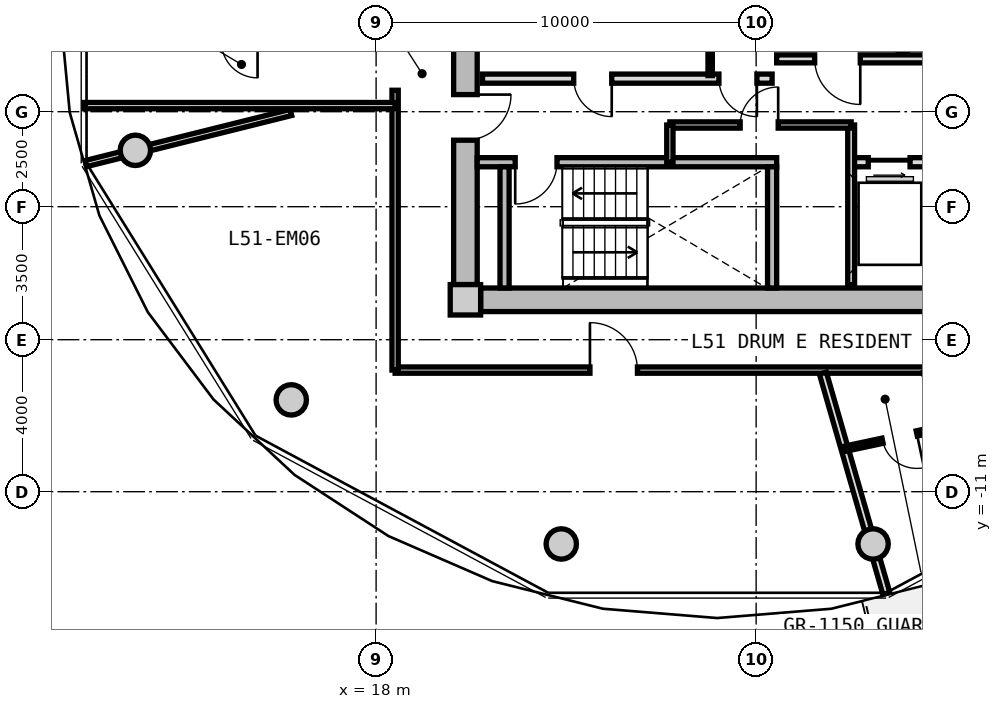
"""IFC4 building model, lengths in metres.
Left out: names, types, materials, properties, quantities, classifications, styles, units other than length and angle.
Written with IfcOpenShell. Run it as: python <this file> out.ifc"""

import sys

from ifc_helpers import new_model, si_unit, direction, frame, frame_2d, origin, origin_2d, place, context, subcontext, project, spatial, rectangle, circle, extrude, source, transform, mapped, element, fill, save


model = new_model("IFC4")
c1 = context("Model", 3, precision=1e-05, world=origin(), true_north=direction((0.0, 1.0)))
c2 = subcontext(c1, "Body", "Model", "MODEL_VIEW")
j1 = project(units=[si_unit("LENGTHUNIT", "METRE"), si_unit("PLANEANGLEUNIT", "RADIAN")], contexts=[c1])
p1 = place(None, origin())
s1 = spatial("IfcSite", under=j1, at=p1, CompositionType="ELEMENT")
p2 = place(p1, origin())
s2 = spatial("IfcBuilding", under=s1, at=p2, CompositionType="ELEMENT")
p3 = place(p2, frame((0.0, 0.0, 164.8)))
s3 = spatial("IfcBuildingStorey", under=s2, at=p3, CompositionType="ELEMENT", Elevation=164.8)
m1 = source(origin(), c2, "Body", "SweptSolid", [
    extrude(rectangle(XDim=0.8, YDim=0.8, at=origin_2d()), origin(), (0.0, 0.0, 1.0), 3.05),
])
p4 = place(p3, frame((20.35, -5.95, 0.0), z_axis=(0.0, 0.0, 1.0), x_axis=(1.0, 0.0, 0.0)))
e1 = element("IfcColumn", 1, at=p4, inside=s3, PredefinedType="COLUMN", context=c2, shape_type="MappedRepresentation", body=[
    mapped(m1, transform((0.0, 0.0, 0.0), x_axis=(1.0, 0.0, 0.0), y_axis=(0.0, 1.0, 0.0), z_axis=(0.0, 0.0, 1.0), scale=1.0)),
])
m2 = source(origin(), c2, "Body", "SweptSolid", [
    extrude(rectangle(XDim=14.5, YDim=0.62, at=frame_2d((7.25, 0.0))), origin(), (0.0, 0.0, 1.0), 2.81),
])
p5 = place(p3, frame((35.25, -5.95, 0.0), z_axis=(0.0, 0.0, 1.0), x_axis=(-1.0, 0.0, 0.0)))
e2 = element("IfcWall", 2, at=p5, inside=s3, PredefinedType="SHEAR", context=c2, shape_type="MappedRepresentation", body=[
    mapped(m2, transform((0.0, 0.0, 0.0), x_axis=(1.0, 0.0, 0.0), y_axis=(0.0, 1.0, 0.0), z_axis=(0.0, 0.0, 1.0), scale=1.0)),
])
m3 = source(origin(), c2, "Body", "SweptSolid", [
    extrude(rectangle(XDim=11.1, YDim=0.62, at=frame_2d((5.55, 0.0))), origin(), (0.0, 0.0, 1.0), 2.81),
])
p6 = place(p3, frame((20.35, -5.55, 0.0), z_axis=(0.0, 0.0, 1.0), x_axis=(0.0, 1.0, 0.0)))
e3 = element("IfcWall", 3, at=p6, inside=s3, PredefinedType="SHEAR", context=c2, shape_type="MappedRepresentation", body=[
    mapped(m3, transform((0.0, 0.0, 0.0), x_axis=(1.0, 0.0, 0.0), y_axis=(0.0, 1.0, 0.0), z_axis=(0.0, 0.0, 1.0), scale=1.0)),
])
p7 = place(p6, frame((3.8, 0.0, 0.0)))
e4 = element("IfcOpeningElement", 4, at=p7, cuts=e3, PredefinedType="OPENING", context=c2, shape_type="SweptSolid", body=[
    extrude(rectangle(XDim=1.2, YDim=2.15, at=frame_2d((0.6, 1.075))), frame((0.0, 0.32, 0.0), z_axis=(0.0, -1.0, 0.0), x_axis=(1.0, 0.0, 0.0)), (0.0, 0.0, 1.0), 0.64),
])
m4 = source(origin(), c2, "Body", "SweptSolid", [
    extrude(circle(Radius=0.4, at=origin_2d()), origin(), (0.0, 0.0, 1.0), 3.05),
])
for number, where, z_axis, x_axis in (
    (5, (11.665, -2.016, 0.0), (0.0, 0.0, 1.0), (1.0, 0.0, 0.0)),
    (6, (15.767, -8.584, 0.0), (0.0, 0.0, 1.0), (1.0, 0.0, 0.0)),
    (7, (22.873, -12.375, 0.0), (0.0, 0.0, 1.0), (1.0, 0.0, 0.0)),
    (8, (31.077, -12.375, 0.0), (0.0, 0.0, 1.0), (1.0, 0.0, 0.0)),
):
    element("IfcColumn", number, at=place(p3, frame(where, z_axis=z_axis, x_axis=x_axis)), inside=s3, PredefinedType="COLUMN", context=c2, shape_type="MappedRepresentation", body=[
        mapped(m4, transform((0.0, 0.0, 0.0), x_axis=(1.0, 0.0, 0.0), y_axis=(0.0, 1.0, 0.0), z_axis=(0.0, 0.0, 1.0), scale=1.0)),
    ])
m5 = source(origin(), c2, "Body", "SweptSolid", [
    extrude(rectangle(XDim=7.88, YDim=0.24, at=frame_2d((3.94, 0.0))), origin(), (0.0, 0.0, 1.0), 2.81),
])
p8 = place(p3, frame((20.66, -2.33, 0.0), z_axis=(0.0, 0.0, 1.0), x_axis=(1.0, 0.0, 0.0)))
e9 = element("IfcWall", 9, at=p8, inside=s3, PredefinedType="PARTITIONING", context=c2, shape_type="MappedRepresentation", body=[
    mapped(m5, transform((0.0, 0.0, 0.0), x_axis=(1.0, 0.0, 0.0), y_axis=(0.0, 1.0, 0.0), z_axis=(0.0, 0.0, 1.0), scale=1.0)),
])
p9 = place(p8, frame((1.0, 0.0, 0.0)))
e10 = element("IfcOpeningElement", 10, at=p9, cuts=e9, PredefinedType="OPENING", context=c2, shape_type="SweptSolid", body=[
    extrude(rectangle(XDim=1.1, YDim=2.15, at=frame_2d((0.55, 1.075))), frame((0.0, 0.13, 0.0), z_axis=(0.0, -1.0, 0.0), x_axis=(1.0, 0.0, 0.0)), (0.0, 0.0, 1.0), 0.26),
])
m6 = source(origin(), c2, "Body", "SweptSolid", [
    extrude(rectangle(XDim=3.19, YDim=0.24, at=frame_2d((1.595, 0.0))), origin(), (0.0, 0.0, 1.0), 2.81),
])
for number, where, z_axis, x_axis in (
    (11, (21.38, -5.64, 0.0), (0.0, 0.0, 1.0), (0.0, 1.0, 0.0)),
    (12, (28.42, -5.64, 0.0), (0.0, 0.0, 1.0), (0.0, 1.0, 0.0)),
):
    element("IfcWall", number, at=place(p3, frame(where, z_axis=z_axis, x_axis=x_axis)), inside=s3, PredefinedType="PARTITIONING", context=c2, shape_type="MappedRepresentation", body=[
        mapped(m6, transform((0.0, 0.0, 0.0), x_axis=(1.0, 0.0, 0.0), y_axis=(0.0, 1.0, 0.0), z_axis=(0.0, 0.0, 1.0), scale=1.0)),
    ])
m7 = source(origin(), c2, "Body", "SweptSolid", [
    extrude(rectangle(XDim=5.0, YDim=0.24, at=frame_2d((2.5, 0.0))), origin(), (0.0, 0.0, 1.0), 2.795),
])
p10 = place(p3, frame((31.86, 0.5, 0.0), z_axis=(0.0, 0.0, 1.0), x_axis=(0.0, 1.0, 0.0)))
e13 = element("IfcWall", 13, at=p10, inside=s3, PredefinedType="PARTITIONING", context=c2, shape_type="MappedRepresentation", body=[
    mapped(m7, transform((0.0, 0.0, 0.0), x_axis=(1.0, 0.0, 0.0), y_axis=(0.0, 1.0, 0.0), z_axis=(0.0, 0.0, 1.0), scale=1.0)),
])
p11 = place(p10, frame((3.05, 0.0, 0.0)))
e14 = element("IfcOpeningElement", 14, at=p11, cuts=e13, PredefinedType="OPENING", context=c2, shape_type="SweptSolid", body=[
    extrude(rectangle(XDim=1.3, YDim=2.2, at=frame_2d((0.65, 1.1))), frame((0.0, 0.13, 0.0), z_axis=(0.0, -1.0, 0.0), x_axis=(1.0, 0.0, 0.0)), (0.0, 0.0, 1.0), 0.26),
])
p12 = place(p10, frame((0.55, 0.0, 0.0)))
e15 = element("IfcOpeningElement", 15, at=p12, cuts=e13, PredefinedType="OPENING", context=c2, shape_type="SweptSolid", body=[
    extrude(rectangle(XDim=1.3, YDim=2.2, at=frame_2d((0.65, 1.1))), frame((0.0, 0.13, 0.0), z_axis=(0.0, -1.0, 0.0), x_axis=(1.0, 0.0, 0.0)), (0.0, 0.0, 1.0), 0.26),
])
m8 = source(origin(), c2, "Body", "SweptSolid", [
    extrude(rectangle(XDim=6.66, YDim=0.21, at=frame_2d((3.33, 0.0))), origin(), (0.0, 0.0, 1.0), 2.795),
])
p13 = place(p3, frame((28.54, 0.39, 0.0), z_axis=(0.0, 0.0, 1.0), x_axis=(1.0, 0.0, 0.0)))
e16 = element("IfcWall", 16, at=p13, inside=s3, PredefinedType="PARTITIONING", context=c2, shape_type="MappedRepresentation", body=[
    mapped(m8, transform((0.0, 0.0, 0.0), x_axis=(1.0, 0.0, 0.0), y_axis=(0.0, 1.0, 0.0), z_axis=(0.0, 0.0, 1.0), scale=1.0)),
])
p14 = place(p13, frame((1.0, 0.0, 0.0)))
e17 = element("IfcOpeningElement", 17, at=p14, cuts=e16, PredefinedType="OPENING", context=c2, shape_type="SweptSolid", body=[
    extrude(rectangle(XDim=1.2, YDim=2.15, at=frame_2d((0.6, 1.075))), frame((0.0, 0.115, 0.0), z_axis=(0.0, -1.0, 0.0), x_axis=(1.0, 0.0, 0.0)), (0.0, 0.0, 1.0), 0.23),
])
m9 = source(origin(), c2, "Body", "SweptSolid", [
    extrude(rectangle(XDim=7.62, YDim=0.24, at=frame_2d((3.81, 0.0))), origin(), (0.0, 0.0, 1.0), 2.795),
])
p15 = place(p3, frame((20.8, -0.13, 0.0), z_axis=(0.0, 0.0, 1.0), x_axis=(1.0, 0.0, 0.0)))
e18 = element("IfcWall", 18, at=p15, inside=s3, PredefinedType="PARTITIONING", context=c2, shape_type="MappedRepresentation", body=[
    mapped(m9, transform((0.0, 0.0, 0.0), x_axis=(1.0, 0.0, 0.0), y_axis=(0.0, 1.0, 0.0), z_axis=(0.0, 0.0, 1.0), scale=1.0)),
])
p16 = place(p15, frame((6.22, 0.0, 0.0)))
e19 = element("IfcOpeningElement", 19, at=p16, cuts=e18, PredefinedType="OPENING", context=c2, shape_type="SweptSolid", body=[
    extrude(rectangle(XDim=1.0, YDim=2.1, at=frame_2d((0.5, 1.05))), frame((0.0, 0.13, 0.0), z_axis=(0.0, -1.0, 0.0), x_axis=(1.0, 0.0, 0.0)), (0.0, 0.0, 1.0), 0.26),
])
p17 = place(p15, frame((2.4, 0.0, 0.0)))
e20 = element("IfcOpeningElement", 20, at=p17, cuts=e18, PredefinedType="OPENING", context=c2, shape_type="SweptSolid", body=[
    extrude(rectangle(XDim=1.0, YDim=2.1, at=frame_2d((0.5, 1.05))), frame((0.0, 0.13, 0.0), z_axis=(0.0, -1.0, 0.0), x_axis=(1.0, 0.0, 0.0)), (0.0, 0.0, 1.0), 0.26),
])
m10 = source(origin(), c2, "Body", "SweptSolid", [
    extrude(rectangle(XDim=2.33, YDim=0.115, at=frame_2d((1.165, 0.0))), origin(), (0.0, 0.0, 1.0), 2.795),
])
p18 = place(p3, frame((26.79, -0.05, 0.0), z_axis=(0.0, 0.0, 1.0), x_axis=(0.0, 1.0, 0.0)))
e21 = element("IfcWall", 21, at=p18, inside=s3, PredefinedType="PARTITIONING", context=c2, shape_type="MappedRepresentation", body=[
    mapped(m10, transform((0.0, 0.0, 0.0), x_axis=(1.0, 0.0, 0.0), y_axis=(0.0, 1.0, 0.0), z_axis=(0.0, 0.0, 1.0), scale=1.0)),
])
m11 = source(origin(), c2, "Body", "SweptSolid", [
    extrude(rectangle(XDim=2.05, YDim=0.24, at=frame_2d((1.025, 0.0))), origin(), (0.0, 0.0, 1.0), 2.795),
])
p19 = place(p3, frame((30.5, -2.33, 0.0), z_axis=(0.0, 0.0, 1.0), x_axis=(1.0, 0.0, 0.0)))
e22 = element("IfcWall", 22, at=p19, inside=s3, PredefinedType="PARTITIONING", context=c2, shape_type="MappedRepresentation", body=[
    mapped(m11, transform((0.0, 0.0, 0.0), x_axis=(1.0, 0.0, 0.0), y_axis=(0.0, 1.0, 0.0), z_axis=(0.0, 0.0, 1.0), scale=1.0)),
])
p20 = place(p19, frame((0.45, 0.0, 0.0)))
e23 = element("IfcOpeningElement", 23, at=p20, cuts=e22, PredefinedType="OPENING", context=c2, shape_type="SweptSolid", body=[
    extrude(rectangle(XDim=1.1, YDim=2.2, at=frame_2d((0.55, 1.1))), frame((0.0, 0.13, 0.0), z_axis=(0.0, -1.0, 0.0), x_axis=(1.0, 0.0, 0.0)), (0.0, 0.0, 1.0), 0.26),
])
m12 = source(origin(), c2, "Body", "SweptSolid", [
    extrude(rectangle(XDim=4.2, YDim=0.18, at=frame_2d((2.1, 0.0))), origin(), (0.0, 0.0, 1.0), 2.795),
])
p21 = place(p3, frame((30.5, -5.55, 0.0), z_axis=(0.0, 0.0, 1.0), x_axis=(0.0, 1.0, 0.0)))
e24 = element("IfcWall", 24, at=p21, inside=s3, PredefinedType="PARTITIONING", context=c2, shape_type="MappedRepresentation", body=[
    mapped(m12, transform((0.0, 0.0, 0.0), x_axis=(1.0, 0.0, 0.0), y_axis=(0.0, 1.0, 0.0), z_axis=(0.0, 0.0, 1.0), scale=1.0)),
])
m13 = source(origin(), c2, "Body", "SweptSolid", [
    extrude(rectangle(XDim=4.77, YDim=0.165, at=frame_2d((2.385, 0.0))), origin(), (0.0, 0.0, 1.0), 2.795),
])
p22 = place(p3, frame((25.73, -1.35, 0.0), z_axis=(0.0, 0.0, 1.0), x_axis=(1.0, 0.0, 0.0)))
e25 = element("IfcWall", 25, at=p22, inside=s3, PredefinedType="PARTITIONING", context=c2, shape_type="MappedRepresentation", body=[
    mapped(m13, transform((0.0, 0.0, 0.0), x_axis=(1.0, 0.0, 0.0), y_axis=(0.0, 1.0, 0.0), z_axis=(0.0, 0.0, 1.0), scale=1.0)),
])
p23 = place(p22, frame((1.85, 0.0, 0.0)))
e26 = element("IfcOpeningElement", 26, at=p23, cuts=e25, PredefinedType="OPENING", context=c2, shape_type="SweptSolid", body=[
    extrude(rectangle(XDim=1.0, YDim=2.1, at=frame_2d((0.5, 1.05))), frame((0.0, 0.093, 0.0), z_axis=(0.0, -1.0, 0.0), x_axis=(1.0, 0.0, 0.0)), (0.0, 0.0, 1.0), 0.185),
])
m14 = source(origin(), c2, "Body", "SweptSolid", [
    extrude(rectangle(XDim=0.98, YDim=0.165, at=frame_2d((0.49, 0.0))), origin(), (0.0, 0.0, 1.0), 2.795),
])
p24 = place(p3, frame((25.73, -2.33, 0.0), z_axis=(0.0, 0.0, 1.0), x_axis=(0.0, 1.0, 0.0)))
e27 = element("IfcWall", 27, at=p24, inside=s3, PredefinedType="PARTITIONING", context=c2, shape_type="MappedRepresentation", body=[
    mapped(m14, transform((0.0, 0.0, 0.0), x_axis=(1.0, 0.0, 0.0), y_axis=(0.0, 1.0, 0.0), z_axis=(0.0, 0.0, 1.0), scale=1.0)),
])
m15 = source(origin(), c2, "Body", "SweptSolid", [
    extrude(rectangle(XDim=19.0, YDim=0.165, at=frame_2d((9.5, 0.0))), origin(), (0.0, 0.0, 1.0), 2.795),
])
p25 = place(p3, frame((37.5, -7.8, 0.0), z_axis=(0.0, 0.0, 1.0), x_axis=(-1.0, 0.0, 0.0)))
e28 = element("IfcWall", 28, at=p25, inside=s3, PredefinedType="PARTITIONING", context=c2, shape_type="MappedRepresentation", body=[
    mapped(m15, transform((0.0, 0.0, 0.0), x_axis=(1.0, 0.0, 0.0), y_axis=(0.0, 1.0, 0.0), z_axis=(0.0, 0.0, 1.0), scale=1.0)),
])
p26 = place(p25, frame((12.623, 0.0, 0.0)))
e29 = element("IfcOpeningElement", 29, at=p26, cuts=e28, PredefinedType="OPENING", context=c2, shape_type="SweptSolid", body=[
    extrude(rectangle(XDim=1.25, YDim=2.2, at=frame_2d((0.625, 1.1))), frame((0.0, 0.093, 0.0), z_axis=(0.0, -1.0, 0.0), x_axis=(1.0, 0.0, 0.0)), (0.0, 0.0, 1.0), 0.185),
])
m16 = source(origin(), c2, "Body", "SweptSolid", [
    extrude(rectangle(XDim=7.365, YDim=0.165, at=frame_2d((3.682, 0.0))), origin(), (0.0, 0.0, 1.0), 2.795),
])
p27 = place(p3, frame((18.5, -7.8, 0.0), z_axis=(0.0, 0.0, 1.0), x_axis=(0.0, 1.0, 0.0)))
e30 = element("IfcWall", 30, at=p27, inside=s3, PredefinedType="PARTITIONING", context=c2, shape_type="MappedRepresentation", body=[
    mapped(m16, transform((0.0, 0.0, 0.0), x_axis=(1.0, 0.0, 0.0), y_axis=(0.0, 1.0, 0.0), z_axis=(0.0, 0.0, 1.0), scale=1.0)),
])
m17 = source(origin(), c2, "Body", "SweptSolid", [
    extrude(rectangle(XDim=5.564, YDim=0.165, at=frame_2d((2.782, 0.0))), origin(), (0.0, 0.0, 1.0), 2.345),
])
p28 = place(p3, frame((15.76, -1.02, 0.0), z_axis=(0.0, 0.0, 1.0), x_axis=(-0.970315176167, -0.241843872984, 0.0)))
e31 = element("IfcWall", 31, at=p28, inside=s3, PredefinedType="PARTITIONING", context=c2, shape_type="MappedRepresentation", body=[
    mapped(m17, transform((0.0, 0.0, 0.0), x_axis=(1.0, 0.0, 0.0), y_axis=(0.0, 1.0, 0.0), z_axis=(0.0, 0.0, 1.0), scale=1.0)),
])
m18 = source(origin(), c2, "Body", "SweptSolid", [
    extrude(rectangle(XDim=8.189, YDim=0.165, at=frame_2d((4.094, 0.0))), origin(), (0.0, 0.0, 1.0), 2.795),
])
p29 = place(p3, frame((18.5, -0.84, 0.0), z_axis=(0.0, 0.0, 1.0), x_axis=(-1.0, 0.0, 0.0)))
e32 = element("IfcWall", 32, at=p29, inside=s3, PredefinedType="PARTITIONING", context=c2, shape_type="MappedRepresentation", body=[
    mapped(m18, transform((0.0, 0.0, 0.0), x_axis=(1.0, 0.0, 0.0), y_axis=(0.0, 1.0, 0.0), z_axis=(0.0, 0.0, 1.0), scale=1.0)),
])
m19 = source(origin(), c2, "Body", "SweptSolid", [
    extrude(rectangle(XDim=6.035, YDim=0.19, at=frame_2d((3.018, 0.0))), origin(), (0.0, 0.0, 1.0), 2.345),
])
p30 = place(p3, frame((29.756, -7.88, 0.0), z_axis=(0.0, 0.0, 1.0), x_axis=(0.276809454862, -0.960924828329, 0.0)))
e33 = element("IfcWall", 33, at=p30, inside=s3, PredefinedType="PARTITIONING", context=c2, shape_type="MappedRepresentation", body=[
    mapped(m19, transform((0.0, 0.0, 0.0), x_axis=(1.0, 0.0, 0.0), y_axis=(0.0, 1.0, 0.0), z_axis=(0.0, 0.0, 1.0), scale=1.0)),
])
m20 = source(origin(), c2, "Body", "SweptSolid", [
    extrude(rectangle(XDim=1.635, YDim=0.14, at=frame_2d((0.817, 0.0))), origin(), (0.0, 0.0, 1.0), 2.795),
])
p31 = place(p3, frame((32.434, -7.83, 0.0), z_axis=(0.0, 0.0, 1.0), x_axis=(0.494078690764, -0.869417188312, 0.0)))
e34 = element("IfcWall", 34, at=p31, inside=s3, PredefinedType="PARTITIONING", context=c2, shape_type="MappedRepresentation", body=[
    mapped(m20, transform((0.0, 0.0, 0.0), x_axis=(1.0, 0.0, 0.0), y_axis=(0.0, 1.0, 0.0), z_axis=(0.0, 0.0, 1.0), scale=1.0)),
])
m21 = source(origin(), c2, "Body", "SweptSolid", [
    extrude(rectangle(XDim=2.995, YDim=0.14, at=frame_2d((1.498, 0.0))), origin(), (0.0, 0.0, 1.0), 2.435),
])
p32 = place(p3, frame((33.241, -9.251, 0.0), z_axis=(0.0, 0.0, 1.0), x_axis=(-0.978075914325, -0.208248663425, 0.0)))
e35 = element("IfcWall", 35, at=p32, inside=s3, PredefinedType="PARTITIONING", context=c2, shape_type="MappedRepresentation", body=[
    mapped(m21, transform((0.0, 0.0, 0.0), x_axis=(1.0, 0.0, 0.0), y_axis=(0.0, 1.0, 0.0), z_axis=(0.0, 0.0, 1.0), scale=1.0)),
])
p33 = place(p32, frame((1.038, 0.0, 0.0)))
e36 = element("IfcOpeningElement", 36, at=p33, cuts=e35, PredefinedType="OPENING", context=c2, shape_type="SweptSolid", body=[
    extrude(rectangle(XDim=0.92, YDim=2.1, at=frame_2d((0.46, 1.05))), frame((0.0, 0.08, 0.0), z_axis=(0.0, -1.0, 0.0), x_axis=(1.0, 0.0, 0.0)), (0.0, 0.0, 1.0), 0.16),
])
m22 = source(origin(), c2, "Body", "SweptSolid", [
    extrude(rectangle(XDim=1.1, YDim=2.15, at=frame_2d((0.55, 1.075))), frame((0.0, 0.025, 0.0), z_axis=(0.0, -1.0, 0.0), x_axis=(1.0, 0.0, 0.0)), (0.0, 0.0, 1.0), 0.05),
])
p34 = place(p9, frame((1.1, 0.0, 0.0), z_axis=(0.0, 0.0, 1.0), x_axis=(-1.0, 0.0, 0.0)))
e37 = element("IfcDoor", 37, at=p34, inside=s3, OperationType="SINGLE_SWING_RIGHT", PredefinedType="DOOR", context=c2, shape_type="MappedRepresentation", body=[
    mapped(m22, transform((0.0, 0.0, 0.0), x_axis=(1.0, 0.0, 0.0), y_axis=(0.0, 1.0, 0.0), z_axis=(0.0, 0.0, 1.0), scale=1.0)),
])
fill(e10, e37)
m23 = source(origin(), c2, "Body", "SweptSolid", [
    extrude(rectangle(XDim=1.2, YDim=2.15, at=frame_2d((0.6, 1.075))), frame((0.0, 0.025, 0.0), z_axis=(0.0, -1.0, 0.0), x_axis=(1.0, 0.0, 0.0)), (0.0, 0.0, 1.0), 0.05),
])
p35 = place(p14, frame((1.2, 0.0, 0.0), z_axis=(0.0, 0.0, 1.0), x_axis=(-1.0, 0.0, 0.0)))
e38 = element("IfcDoor", 38, at=p35, inside=s3, OperationType="SINGLE_SWING_LEFT", PredefinedType="DOOR", context=c2, shape_type="MappedRepresentation", body=[
    mapped(m23, transform((0.0, 0.0, 0.0), x_axis=(1.0, 0.0, 0.0), y_axis=(0.0, 1.0, 0.0), z_axis=(0.0, 0.0, 1.0), scale=1.0)),
])
fill(e17, e38)
p36 = place(p7, frame((1.2, 0.0, 0.0), z_axis=(0.0, 0.0, 1.0), x_axis=(-1.0, 0.0, 0.0)))
e39 = element("IfcDoor", 39, at=p36, inside=s3, OperationType="SINGLE_SWING_LEFT", PredefinedType="DOOR", context=c2, shape_type="MappedRepresentation", body=[
    mapped(m23, transform((0.0, 0.0, 0.0), x_axis=(1.0, 0.0, 0.0), y_axis=(0.0, 1.0, 0.0), z_axis=(0.0, 0.0, 1.0), scale=1.0)),
])
fill(e4, e39)
m24 = source(origin(), c2, "Body", "SweptSolid", [
    extrude(rectangle(XDim=1.0, YDim=2.1, at=frame_2d((0.5, 1.05))), frame((0.0, 0.025, 0.0), z_axis=(0.0, -1.0, 0.0), x_axis=(1.0, 0.0, 0.0)), (0.0, 0.0, 1.0), 0.05),
])
p37 = place(p16, frame((1.0, 0.0, 0.0), z_axis=(0.0, 0.0, 1.0), x_axis=(-1.0, 0.0, 0.0)))
e40 = element("IfcDoor", 40, at=p37, inside=s3, OperationType="SINGLE_SWING_LEFT", PredefinedType="DOOR", context=c2, shape_type="MappedRepresentation", body=[
    mapped(m24, transform((0.0, 0.0, 0.0), x_axis=(1.0, 0.0, 0.0), y_axis=(0.0, 1.0, 0.0), z_axis=(0.0, 0.0, 1.0), scale=1.0)),
])
fill(e19, e40)
p38 = place(p17, frame((1.0, 0.0, 0.0), z_axis=(0.0, 0.0, 1.0), x_axis=(-1.0, 0.0, 0.0)))
e41 = element("IfcDoor", 41, at=p38, inside=s3, OperationType="SINGLE_SWING_LEFT", PredefinedType="DOOR", context=c2, shape_type="MappedRepresentation", body=[
    mapped(m24, transform((0.0, 0.0, 0.0), x_axis=(1.0, 0.0, 0.0), y_axis=(0.0, 1.0, 0.0), z_axis=(0.0, 0.0, 1.0), scale=1.0)),
])
fill(e20, e41)
m25 = source(origin(), c2, "Body", "SweptSolid", [
    extrude(rectangle(XDim=1.1, YDim=2.2, at=frame_2d((0.55, 1.1))), frame((0.0, 0.025, 0.0), z_axis=(0.0, -1.0, 0.0), x_axis=(1.0, 0.0, 0.0)), (0.0, 0.0, 1.0), 0.05),
])
p39 = place(p20, frame((1.1, 0.0, 0.0), z_axis=(0.0, 0.0, 1.0), x_axis=(-1.0, 0.0, 0.0)))
e42 = element("IfcDoor", 42, at=p39, inside=s3, OperationType="SLIDING_TO_RIGHT", PredefinedType="DOOR", context=c2, shape_type="MappedRepresentation", body=[
    mapped(m25, transform((0.0, 0.0, 0.0), x_axis=(1.0, 0.0, 0.0), y_axis=(0.0, 1.0, 0.0), z_axis=(0.0, 0.0, 1.0), scale=1.0)),
])
fill(e23, e42)
p40 = place(p23, origin())
e43 = element("IfcDoor", 43, at=p40, inside=s3, OperationType="SINGLE_SWING_RIGHT", PredefinedType="DOOR", context=c2, shape_type="MappedRepresentation", body=[
    mapped(m24, transform((0.0, 0.0, 0.0), x_axis=(1.0, 0.0, 0.0), y_axis=(0.0, 1.0, 0.0), z_axis=(0.0, 0.0, 1.0), scale=1.0)),
])
fill(e26, e43)
m26 = source(origin(), c2, "Body", "SweptSolid", [
    extrude(rectangle(XDim=1.25, YDim=2.2, at=frame_2d((0.625, 1.1))), frame((0.0, 0.025, 0.0), z_axis=(0.0, -1.0, 0.0), x_axis=(1.0, 0.0, 0.0)), (0.0, 0.0, 1.0), 0.05),
])
p41 = place(p26, frame((1.25, 0.0, 0.0), z_axis=(0.0, 0.0, 1.0), x_axis=(-1.0, 0.0, 0.0)))
e44 = element("IfcDoor", 44, at=p41, inside=s3, OperationType="SINGLE_SWING_LEFT", PredefinedType="DOOR", context=c2, shape_type="MappedRepresentation", body=[
    mapped(m26, transform((0.0, 0.0, 0.0), x_axis=(1.0, 0.0, 0.0), y_axis=(0.0, 1.0, 0.0), z_axis=(0.0, 0.0, 1.0), scale=1.0)),
])
fill(e29, e44)
m27 = source(origin(), c2, "Body", "SweptSolid", [
    extrude(rectangle(XDim=0.92, YDim=2.1, at=frame_2d((0.46, 1.05))), frame((0.0, 0.025, 0.0), z_axis=(0.0, -1.0, 0.0), x_axis=(1.0, 0.0, 0.0)), (0.0, 0.0, 1.0), 0.05),
])
p42 = place(p33, origin())
e45 = element("IfcDoor", 45, at=p42, inside=s3, OperationType="SINGLE_SWING_LEFT", PredefinedType="DOOR", context=c2, shape_type="MappedRepresentation", body=[
    mapped(m27, transform((0.0, 0.0, 0.0), x_axis=(1.0, 0.0, 0.0), y_axis=(0.0, 1.0, 0.0), z_axis=(0.0, 0.0, 1.0), scale=1.0)),
])
fill(e36, e45)
save(model, sys.argv[1])
